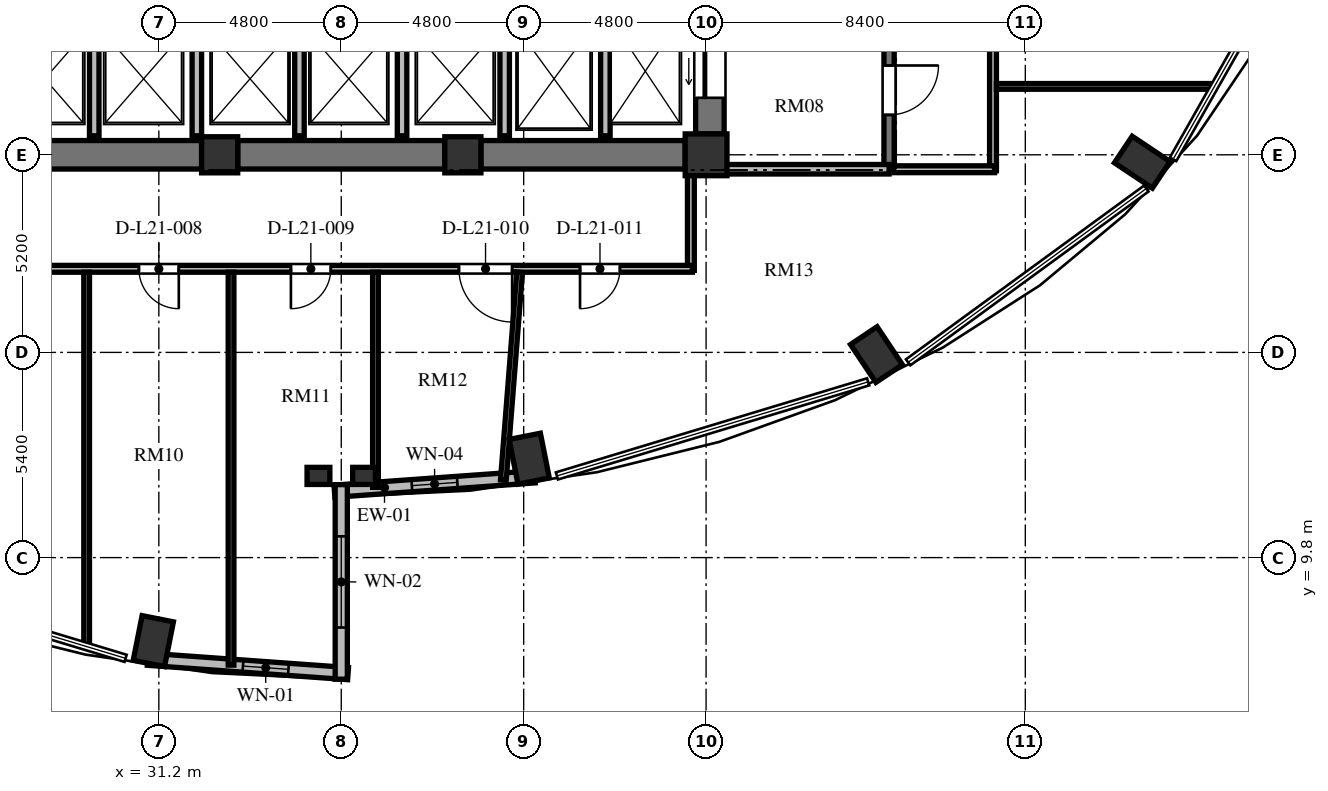
"""IFC4 building model, lengths in metres.
Left out: names, types, materials, properties, quantities, classifications, styles, units other than length and angle.
Written with IfcOpenShell. Run it as: python <this file> out.ifc"""

import sys

from ifc_helpers import new_model, si_unit, direction, frame, frame_2d, origin, origin_2d, place, context, subcontext, project, spatial, rectangle, extrude, element, fill, save


model = new_model("IFC4")
c1 = context("Model", 3, precision=1e-05, world=origin(), true_north=direction((0.0, 1.0)))
c2 = subcontext(c1, "Body", "Model", "MODEL_VIEW")
j1 = project(units=[si_unit("LENGTHUNIT", "METRE"), si_unit("PLANEANGLEUNIT", "RADIAN")], contexts=[c1])
p1 = place(None, origin())
s1 = spatial("IfcSite", under=j1, at=p1, CompositionType="ELEMENT")
p2 = place(p1, origin())
s2 = spatial("IfcBuilding", under=s1, at=p2, CompositionType="ELEMENT")
p3 = place(p2, frame((0.0, 0.0, 85.392)))
s3 = spatial("IfcBuildingStorey", under=s2, at=p3, CompositionType="ELEMENT", Elevation=85.392)
for number, where, z_axis, x_axis in (
    (1, (40.946, 12.403, 0.0), (0.0, 0.0, 1.0), (0.195, -0.981, 0.0)),
    (2, (50.084, 15.143, 0.0), (0.0, 0.0, 1.0), (0.556, -0.831, 0.0)),
    (3, (57.078, 20.205, 0.0), (0.0, 0.0, 1.0), (0.831, -0.556, 0.0)),
    (4, (31.054, 7.603, 0.0), (0.0, 0.0, 1.0), (-0.195, -0.981, 0.0)),
):
    element("IfcColumn", number, at=place(p3, frame(where, z_axis=z_axis, x_axis=x_axis)), inside=s3, PredefinedType="COLUMN", context=c2, shape_type="SweptSolid", body=[
        extrude(rectangle(XDim=1.2, YDim=0.84, at=origin_2d()), origin(), (0.0, 0.0, 1.0), 3.648),
    ])
for number, where, z_axis, x_axis in (
    (5, (32.8, 20.4, 0.0), (0.0, 0.0, 1.0), (1.0, 0.0, 0.0)),
    (6, (39.2, 20.4, 0.0), (0.0, 0.0, 1.0), (1.0, 0.0, 0.0)),
):
    element("IfcColumn", number, at=place(p3, frame(where, z_axis=z_axis, x_axis=x_axis)), inside=s3, PredefinedType="COLUMN", context=c2, shape_type="SweptSolid", body=[
        extrude(rectangle(XDim=0.95, YDim=0.95, at=origin_2d()), origin(), (0.0, 0.0, 1.0), 3.648),
    ])
p4 = place(p3, frame((45.6, 20.4, 0.0), z_axis=(0.0, 0.0, 1.0), x_axis=(1.0, 0.0, 0.0)))
e7 = element("IfcColumn", 7, at=p4, inside=s3, PredefinedType="COLUMN", context=c2, shape_type="SweptSolid", body=[
    extrude(rectangle(XDim=1.1, YDim=1.1, at=origin_2d()), origin(), (0.0, 0.0, 1.0), 3.648),
])
for number, where, z_axis, x_axis in (
    (8, (35.4, 11.95, 0.0), (0.0, 0.0, 1.0), (1.0, 0.0, 0.0)),
    (9, (36.6, 11.95, 0.0), (0.0, 0.0, 1.0), (1.0, 0.0, 0.0)),
):
    element("IfcColumn", number, at=place(p3, frame(where, z_axis=z_axis, x_axis=x_axis)), inside=s3, PredefinedType="PILASTER", context=c2, shape_type="SweptSolid", body=[
        extrude(rectangle(XDim=0.6, YDim=0.45, at=origin_2d()), origin(), (0.0, 0.0, 1.0), 3.648),
    ])
p5 = place(p3, frame((45.7, 20.95, 0.0), z_axis=(0.0, 0.0, 1.0), x_axis=(0.0, 1.0, 0.0)))
e10 = element("IfcWall", 10, at=p5, inside=s3, PredefinedType="SHEAR", context=c2, shape_type="SweptSolid", body=[
    extrude(rectangle(XDim=14.1, YDim=0.75, at=frame_2d((7.05, 0.0))), origin(), (0.0, 0.0, 1.0), 3.648),
])
p6 = place(p5, frame((11.75, 0.0, 0.0)))
e11 = element("IfcOpeningElement", 11, at=p6, cuts=e10, PredefinedType="OPENING", context=c2, shape_type="SweptSolid", body=[
    extrude(rectangle(XDim=1.4, YDim=2.3, at=frame_2d((0.7, 1.15))), frame((0.0, 0.385, 0.0), z_axis=(0.0, -1.0, 0.0), x_axis=(1.0, 0.0, 0.0)), (0.0, 0.0, 1.0), 0.77),
])
p7 = place(p5, frame((0.95, 0.0, 0.0)))
e12 = element("IfcOpeningElement", 12, at=p7, cuts=e10, PredefinedType="OPENING", context=c2, shape_type="SweptSolid", body=[
    extrude(rectangle(XDim=1.4, YDim=2.3, at=frame_2d((0.7, 1.15))), frame((0.0, 0.385, 0.0), z_axis=(0.0, -1.0, 0.0), x_axis=(1.0, 0.0, 0.0)), (0.0, 0.0, 1.0), 0.77),
])
p8 = place(p3, frame((26.95, 20.4, 0.0), z_axis=(0.0, 0.0, 1.0), x_axis=(1.0, 0.0, 0.0)))
e13 = element("IfcWall", 13, at=p8, inside=s3, PredefinedType="SHEAR", context=c2, shape_type="SweptSolid", body=[
    extrude(rectangle(XDim=5.375, YDim=0.75, at=frame_2d((2.688, 0.0))), origin(), (0.0, 0.0, 1.0), 3.648),
])
p9 = place(p3, frame((33.275, 20.4, 0.0), z_axis=(0.0, 0.0, 1.0), x_axis=(1.0, 0.0, 0.0)))
e14 = element("IfcWall", 14, at=p9, inside=s3, PredefinedType="SHEAR", context=c2, shape_type="SweptSolid", body=[
    extrude(rectangle(XDim=5.45, YDim=0.75, at=frame_2d((2.725, 0.0))), origin(), (0.0, 0.0, 1.0), 3.648),
])
p10 = place(p3, frame((39.675, 20.4, 0.0), z_axis=(0.0, 0.0, 1.0), x_axis=(1.0, 0.0, 0.0)))
e15 = element("IfcWall", 15, at=p10, inside=s3, PredefinedType="SHEAR", context=c2, shape_type="SweptSolid", body=[
    extrude(rectangle(XDim=5.375, YDim=0.75, at=frame_2d((2.688, 0.0))), origin(), (0.0, 0.0, 1.0), 3.648),
])
p11 = place(p3, frame((35.821, 11.547, 0.0), z_axis=(0.0, 0.0, 1.0), x_axis=(0.997432364291, 0.071614793619, 0.0)))
e16 = element("IfcWall", 16, at=p11, inside=s3, PredefinedType="SOLIDWALL", context=c2, shape_type="SweptSolid", body=[
    extrude(rectangle(XDim=5.284, YDim=0.32, at=frame_2d((2.642, 0.0))), origin(), (0.0, 0.0, 1.0), 3.428),
])
p12 = place(p11, frame((2.042, 0.0, 0.85)))
e17 = element("IfcOpeningElement", 17, at=p12, cuts=e16, PredefinedType="OPENING", context=c2, shape_type="SweptSolid", body=[
    extrude(rectangle(XDim=1.2, YDim=1.8, at=frame_2d((0.6, 0.9))), frame((0.0, 0.17, 0.0), z_axis=(0.0, -1.0, 0.0), x_axis=(1.0, 0.0, 0.0)), (0.0, 0.0, 1.0), 0.34),
])
p13 = place(p3, frame((30.909, 7.125, 0.0), z_axis=(0.0, 0.0, 1.0), x_axis=(0.997431890304, -0.071621394884, 0.0)))
e18 = element("IfcWall", 18, at=p13, inside=s3, PredefinedType="SOLIDWALL", context=c2, shape_type="SweptSolid", body=[
    extrude(rectangle(XDim=5.284, YDim=0.32, at=frame_2d((2.642, 0.0))), origin(), (0.0, 0.0, 1.0), 3.428),
])
p14 = place(p13, frame((2.511, 0.0, 0.85)))
e19 = element("IfcOpeningElement", 19, at=p14, cuts=e18, PredefinedType="OPENING", context=c2, shape_type="SweptSolid", body=[
    extrude(rectangle(XDim=1.2, YDim=2.2, at=frame_2d((0.6, 1.1))), frame((0.0, 0.17, 0.0), z_axis=(0.0, -1.0, 0.0), x_axis=(1.0, 0.0, 0.0)), (0.0, 0.0, 1.0), 0.34),
])
p15 = place(p3, frame((36.0, 6.6, 0.0), z_axis=(0.0, 0.0, 1.0), x_axis=(0.0, 1.0, 0.0)))
e20 = element("IfcWall", 20, at=p15, inside=s3, PredefinedType="SOLIDWALL", context=c2, shape_type="SweptSolid", body=[
    extrude(rectangle(XDim=5.12, YDim=0.32, at=frame_2d((2.56, 0.0))), origin(), (0.0, 0.0, 1.0), 3.428),
])
p16 = place(p15, frame((1.36, 0.0, 0.84)))
e21 = element("IfcOpeningElement", 21, at=p16, cuts=e20, PredefinedType="OPENING", context=c2, shape_type="SweptSolid", body=[
    extrude(rectangle(XDim=2.4, YDim=2.04, at=frame_2d((1.2, 1.02))), frame((0.0, 0.17, 0.0), z_axis=(0.0, -1.0, 0.0), x_axis=(1.0, 0.0, 0.0)), (0.0, 0.0, 1.0), 0.34),
])
p17 = place(p3, frame((42.95, 20.9, 0.0), z_axis=(0.0, 0.0, 1.0), x_axis=(0.0, 1.0, 0.0)))
e22 = element("IfcWall", 22, at=p17, inside=s3, PredefinedType="SOLIDWALL", context=c2, shape_type="SweptSolid", body=[
    extrude(rectangle(XDim=3.2, YDim=0.25, at=frame_2d((1.6, 0.0))), origin(), (0.0, 0.0, 1.0), 3.428),
])
for number, where, z_axis, x_axis in (
    (23, (29.5, 20.9, 0.0), (0.0, 0.0, 1.0), (0.0, 1.0, 0.0)),
    (24, (32.2, 20.9, 0.0), (0.0, 0.0, 1.0), (0.0, 1.0, 0.0)),
    (25, (34.9, 20.9, 0.0), (0.0, 0.0, 1.0), (0.0, 1.0, 0.0)),
    (26, (37.6, 20.9, 0.0), (0.0, 0.0, 1.0), (0.0, 1.0, 0.0)),
    (27, (40.3, 20.9, 0.0), (0.0, 0.0, 1.0), (0.0, 1.0, 0.0)),
):
    element("IfcWall", number, at=place(p3, frame(where, z_axis=z_axis, x_axis=x_axis)), inside=s3, PredefinedType="SOLIDWALL", context=c2, shape_type="SweptSolid", body=[
        extrude(rectangle(XDim=2.8, YDim=0.25, at=frame_2d((1.4, 0.0))), origin(), (0.0, 0.0, 1.0), 3.428),
    ])
p18 = place(p3, frame((50.415, 35.845, 0.0), z_axis=(0.0, 0.0, 1.0), x_axis=(0.0, -1.0, 0.0)))
e28 = element("IfcWall", 28, at=p18, inside=s3, PredefinedType="SHEAR", context=c2, shape_type="SweptSolid", body=[
    extrude(rectangle(XDim=15.825, YDim=0.27, at=frame_2d((7.913, 0.0))), origin(), (0.0, 0.0, 1.0), 3.648),
])
p19 = place(p18, frame((4.445, 0.0, 0.0)))
e29 = element("IfcOpeningElement", 29, at=p19, cuts=e28, PredefinedType="OPENING", context=c2, shape_type="SweptSolid", body=[
    extrude(rectangle(XDim=1.2, YDim=2.15, at=frame_2d((0.6, 1.075))), frame((0.0, 0.145, 0.0), z_axis=(0.0, -1.0, 0.0), x_axis=(1.0, 0.0, 0.0)), (0.0, 0.0, 1.0), 0.29),
])
p20 = place(p18, frame((1.295, 0.0, 0.0)))
e30 = element("IfcOpeningElement", 30, at=p20, cuts=e28, PredefinedType="OPENING", context=c2, shape_type="SweptSolid", body=[
    extrude(rectangle(XDim=1.3, YDim=2.2, at=frame_2d((0.65, 1.1))), frame((0.0, 0.145, 0.0), z_axis=(0.0, -1.0, 0.0), x_axis=(1.0, 0.0, 0.0)), (0.0, 0.0, 1.0), 0.29),
])
p21 = place(p18, frame((13.095, 0.0, 0.0)))
e31 = element("IfcOpeningElement", 31, at=p21, cuts=e28, PredefinedType="OPENING", context=c2, shape_type="SweptSolid", body=[
    extrude(rectangle(XDim=1.3, YDim=2.2, at=frame_2d((0.65, 1.1))), frame((0.0, 0.145, 0.0), z_axis=(0.0, -1.0, 0.0), x_axis=(1.0, 0.0, 0.0)), (0.0, 0.0, 1.0), 0.29),
])
p22 = place(p3, frame((45.7, 20.02, 0.0), z_axis=(0.0, 0.0, 1.0), x_axis=(1.0, 0.0, 0.0)))
e32 = element("IfcWall", 32, at=p22, inside=s3, PredefinedType="SOLIDWALL", context=c2, shape_type="SweptSolid", body=[
    extrude(rectangle(XDim=4.715, YDim=0.25, at=frame_2d((2.357, 0.0))), origin(), (0.0, 0.0, 1.0), 3.428),
])
p23 = place(p3, frame((53.15, 26.64, 0.0), z_axis=(0.0, 0.0, 1.0), x_axis=(0.0, -1.0, 0.0)))
e33 = element("IfcWall", 33, at=p23, inside=s3, PredefinedType="PARTITIONING", context=c2, shape_type="SweptSolid", body=[
    extrude(rectangle(XDim=6.66, YDim=0.18, at=frame_2d((3.33, 0.0))), origin(), (0.0, 0.0, 1.0), 3.428),
])
p24 = place(p3, frame((53.19, 20.02, 0.0), z_axis=(0.0, 0.0, 1.0), x_axis=(-1.0, 0.0, 0.0)))
e34 = element("IfcWall", 34, at=p24, inside=s3, PredefinedType="PARTITIONING", context=c2, shape_type="SweptSolid", body=[
    extrude(rectangle(XDim=2.65, YDim=0.18, at=frame_2d((1.325, 0.0))), origin(), (0.0, 0.0, 1.0), 3.428),
])
p25 = place(p3, frame((45.2, 19.91, 0.0), z_axis=(0.0, 0.0, 1.0), x_axis=(0.0, -1.0, 0.0)))
e35 = element("IfcWall", 35, at=p25, inside=s3, PredefinedType="PARTITIONING", context=c2, shape_type="SweptSolid", body=[
    extrude(rectangle(XDim=2.55, YDim=0.18, at=frame_2d((1.275, 0.0))), origin(), (0.0, 0.0, 1.0), 3.428),
])
p26 = place(p3, frame((45.24, 17.4, 0.0), z_axis=(0.0, 0.0, 1.0), x_axis=(-1.0, 0.0, 0.0)))
e36 = element("IfcWall", 36, at=p26, inside=s3, PredefinedType="PARTITIONING", context=c2, shape_type="SweptSolid", body=[
    extrude(rectangle(XDim=21.93, YDim=0.18, at=frame_2d((10.965, 0.0))), origin(), (0.0, 0.0, 1.0), 3.053),
])
p27 = place(p26, frame((18.251, 0.0, 0.0)))
e37 = element("IfcOpeningElement", 37, at=p27, cuts=e36, PredefinedType="OPENING", context=c2, shape_type="SweptSolid", body=[
    extrude(rectangle(XDim=1.05, YDim=2.15, at=frame_2d((0.525, 1.075))), frame((0.0, 0.1, 0.0), z_axis=(0.0, -1.0, 0.0), x_axis=(1.0, 0.0, 0.0)), (0.0, 0.0, 1.0), 0.2),
])
p28 = place(p26, frame((13.515, 0.0, 0.0)))
e38 = element("IfcOpeningElement", 38, at=p28, cuts=e36, PredefinedType="OPENING", context=c2, shape_type="SweptSolid", body=[
    extrude(rectangle(XDim=1.05, YDim=2.15, at=frame_2d((0.525, 1.075))), frame((0.0, 0.1, 0.0), z_axis=(0.0, -1.0, 0.0), x_axis=(1.0, 0.0, 0.0)), (0.0, 0.0, 1.0), 0.2),
])
p29 = place(p26, frame((9.515, 0.0, 0.0)))
e39 = element("IfcOpeningElement", 39, at=p29, cuts=e36, PredefinedType="OPENING", context=c2, shape_type="SweptSolid", body=[
    extrude(rectangle(XDim=1.05, YDim=2.15, at=frame_2d((0.525, 1.075))), frame((0.0, 0.1, 0.0), z_axis=(0.0, -1.0, 0.0), x_axis=(1.0, 0.0, 0.0)), (0.0, 0.0, 1.0), 0.2),
])
p30 = place(p26, frame((4.743, 0.0, 0.0)))
e40 = element("IfcOpeningElement", 40, at=p30, cuts=e36, PredefinedType="OPENING", context=c2, shape_type="SweptSolid", body=[
    extrude(rectangle(XDim=1.4, YDim=2.2, at=frame_2d((0.7, 1.1))), frame((0.0, 0.1, 0.0), z_axis=(0.0, -1.0, 0.0), x_axis=(1.0, 0.0, 0.0)), (0.0, 0.0, 1.0), 0.2),
])
p31 = place(p26, frame((1.907, 0.0, 0.0)))
e41 = element("IfcOpeningElement", 41, at=p31, cuts=e36, PredefinedType="OPENING", context=c2, shape_type="SweptSolid", body=[
    extrude(rectangle(XDim=1.05, YDim=2.15, at=frame_2d((0.525, 1.075))), frame((0.0, 0.1, 0.0), z_axis=(0.0, -1.0, 0.0), x_axis=(1.0, 0.0, 0.0)), (0.0, 0.0, 1.0), 0.2),
])
p32 = place(p3, frame((53.24, 22.2, 0.0), z_axis=(0.0, 0.0, 1.0), x_axis=(1.0, 0.0, 0.0)))
e42 = element("IfcWall", 42, at=p32, inside=s3, PredefinedType="PARTITIONING", context=c2, shape_type="SweptSolid", body=[
    extrude(rectangle(XDim=5.731, YDim=0.15, at=frame_2d((2.866, 0.0))), origin(), (0.0, 0.0, 1.0), 3.428),
])
p33 = place(p3, frame((29.3, 7.473, 0.0), z_axis=(0.0, 0.0, 1.0), x_axis=(0.0, 1.0, 0.0)))
e43 = element("IfcWall", 43, at=p33, inside=s3, PredefinedType="PARTITIONING", context=c2, shape_type="SweptSolid", body=[
    extrude(rectangle(XDim=9.837, YDim=0.15, at=frame_2d((4.918, 0.0))), origin(), (0.0, 0.0, 1.0), 3.428),
])
p34 = place(p3, frame((33.1, 6.971, 0.0), z_axis=(0.0, 0.0, 1.0), x_axis=(0.0, 1.0, 0.0)))
e44 = element("IfcWall", 44, at=p34, inside=s3, PredefinedType="PARTITIONING", context=c2, shape_type="SweptSolid", body=[
    extrude(rectangle(XDim=10.339, YDim=0.15, at=frame_2d((5.17, 0.0))), origin(), (0.0, 0.0, 1.0), 3.428),
])
p35 = place(p3, frame((36.9, 11.649, 0.0), z_axis=(0.0, 0.0, 1.0), x_axis=(0.0, 1.0, 0.0)))
e45 = element("IfcWall", 45, at=p35, inside=s3, PredefinedType="PARTITIONING", context=c2, shape_type="SweptSolid", body=[
    extrude(rectangle(XDim=5.661, YDim=0.15, at=frame_2d((2.83, 0.0))), origin(), (0.0, 0.0, 1.0), 3.428),
])
p36 = place(p3, frame((40.265, 11.838, 0.0), z_axis=(0.0, 0.0, 1.0), x_axis=(0.078196446306, 0.996937969878, 0.0)))
e46 = element("IfcWall", 46, at=p36, inside=s3, PredefinedType="PARTITIONING", context=c2, shape_type="SweptSolid", body=[
    extrude(rectangle(XDim=5.489, YDim=0.15, at=frame_2d((2.744, 0.0))), origin(), (0.0, 0.0, 1.0), 3.428),
])
p37 = place(p12, origin())
e47 = element("IfcWindow", 47, at=p37, inside=s3, PartitioningType="SINGLE_PANEL", PredefinedType="WINDOW", context=c2, shape_type="SweptSolid", body=[
    extrude(rectangle(XDim=1.2, YDim=1.8, at=frame_2d((0.6, 0.9))), frame((0.0, 0.03, 0.0), z_axis=(0.0, -1.0, 0.0), x_axis=(1.0, 0.0, 0.0)), (0.0, 0.0, 1.0), 0.06),
])
fill(e17, e47)
p38 = place(p14, origin())
e48 = element("IfcWindow", 48, at=p38, inside=s3, PartitioningType="SINGLE_PANEL", PredefinedType="WINDOW", context=c2, shape_type="SweptSolid", body=[
    extrude(rectangle(XDim=1.2, YDim=2.2, at=frame_2d((0.6, 1.1))), frame((0.0, 0.03, 0.0), z_axis=(0.0, -1.0, 0.0), x_axis=(1.0, 0.0, 0.0)), (0.0, 0.0, 1.0), 0.06),
])
fill(e19, e48)
p39 = place(p16, origin())
e49 = element("IfcWindow", 49, at=p39, inside=s3, PartitioningType="SINGLE_PANEL", PredefinedType="WINDOW", context=c2, shape_type="SweptSolid", body=[
    extrude(rectangle(XDim=2.4, YDim=2.04, at=frame_2d((1.2, 1.02))), frame((0.0, 0.03, 0.0), z_axis=(0.0, -1.0, 0.0), x_axis=(1.0, 0.0, 0.0)), (0.0, 0.0, 1.0), 0.06),
])
fill(e21, e49)
p40 = place(p7, origin())
e50 = element("IfcDoor", 50, at=p40, inside=s3, OperationType="SLIDING_TO_LEFT", PredefinedType="DOOR", context=c2, shape_type="SweptSolid", body=[
    extrude(rectangle(XDim=1.4, YDim=2.3, at=frame_2d((0.7, 1.15))), frame((0.0, 0.025, 0.0), z_axis=(0.0, -1.0, 0.0), x_axis=(1.0, 0.0, 0.0)), (0.0, 0.0, 1.0), 0.05),
])
fill(e12, e50)
p41 = place(p21, origin())
e51 = element("IfcDoor", 51, at=p41, inside=s3, OperationType="SINGLE_SWING_LEFT", PredefinedType="DOOR", context=c2, shape_type="SweptSolid", body=[
    extrude(rectangle(XDim=1.3, YDim=2.2, at=frame_2d((0.65, 1.1))), frame((0.0, 0.025, 0.0), z_axis=(0.0, -1.0, 0.0), x_axis=(1.0, 0.0, 0.0)), (0.0, 0.0, 1.0), 0.05),
])
fill(e31, e51)
p42 = place(p28, origin())
e52 = element("IfcDoor", 52, at=p42, inside=s3, OperationType="SINGLE_SWING_LEFT", PredefinedType="DOOR", context=c2, shape_type="SweptSolid", body=[
    extrude(rectangle(XDim=1.05, YDim=2.15, at=frame_2d((0.525, 1.075))), frame((0.0, 0.025, 0.0), z_axis=(0.0, -1.0, 0.0), x_axis=(1.0, 0.0, 0.0)), (0.0, 0.0, 1.0), 0.05),
])
fill(e38, e52)
p43 = place(p29, origin())
e53 = element("IfcDoor", 53, at=p43, inside=s3, OperationType="SINGLE_SWING_RIGHT", PredefinedType="DOOR", context=c2, shape_type="SweptSolid", body=[
    extrude(rectangle(XDim=1.05, YDim=2.15, at=frame_2d((0.525, 1.075))), frame((0.0, 0.025, 0.0), z_axis=(0.0, -1.0, 0.0), x_axis=(1.0, 0.0, 0.0)), (0.0, 0.0, 1.0), 0.05),
])
fill(e39, e53)
p44 = place(p30, origin())
e54 = element("IfcDoor", 54, at=p44, inside=s3, OperationType="SINGLE_SWING_LEFT", PredefinedType="DOOR", context=c2, shape_type="SweptSolid", body=[
    extrude(rectangle(XDim=1.4, YDim=2.2, at=frame_2d((0.7, 1.1))), frame((0.0, 0.025, 0.0), z_axis=(0.0, -1.0, 0.0), x_axis=(1.0, 0.0, 0.0)), (0.0, 0.0, 1.0), 0.05),
])
fill(e40, e54)
p45 = place(p31, origin())
e55 = element("IfcDoor", 55, at=p45, inside=s3, OperationType="SINGLE_SWING_RIGHT", PredefinedType="DOOR", context=c2, shape_type="SweptSolid", body=[
    extrude(rectangle(XDim=1.05, YDim=2.15, at=frame_2d((0.525, 1.075))), frame((0.0, 0.025, 0.0), z_axis=(0.0, -1.0, 0.0), x_axis=(1.0, 0.0, 0.0)), (0.0, 0.0, 1.0), 0.05),
])
fill(e41, e55)
save(model, sys.argv[1])
